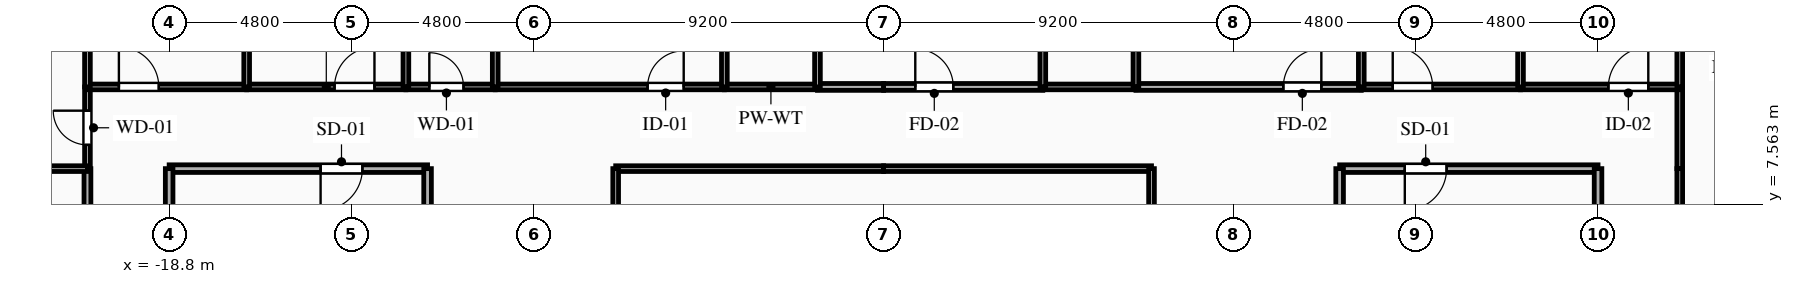
"""IFC4 building model, lengths in metres.
Left out: names, types, materials, properties, quantities, classifications, styles, units other than length and angle.
Written with IfcOpenShell. Run it as: python <this file> out.ifc"""

import sys

from ifc_helpers import new_model, si_unit, direction, frame, frame_2d, origin, place, context, subcontext, project, spatial, rectangle, extrude, element, fill, save


model = new_model("IFC4")
c1 = context("Model", 3, precision=1e-05, world=origin(), true_north=direction((0.0, 1.0)))
c2 = subcontext(c1, "Body", "Model", "MODEL_VIEW")
j1 = project(units=[si_unit("LENGTHUNIT", "METRE"), si_unit("PLANEANGLEUNIT", "RADIAN")], contexts=[c1])
p1 = place(None, origin())
s1 = spatial("IfcSite", under=j1, at=p1, CompositionType="ELEMENT")
p2 = place(p1, origin())
s2 = spatial("IfcBuilding", under=s1, at=p2, CompositionType="ELEMENT")
p3 = place(p2, frame((0.0, 0.0, 131.0)))
s3 = spatial("IfcBuildingStorey", under=s2, at=p3, CompositionType="ELEMENT", Elevation=131.0)
p4 = place(p3, frame((-12.0, 8.5, 0.0), z_axis=(0.0, 0.0, 1.0), x_axis=(-1.0, 0.0, 0.0)))
e1 = element("IfcWall", 1, at=p4, inside=s3, PredefinedType="PARTITIONING", context=c2, shape_type="SweptSolid", body=[
    extrude(rectangle(XDim=6.8, YDim=0.2, at=frame_2d((3.4, 0.0))), origin(), (0.0, 0.0, 1.0), 3.04),
])
p5 = place(p4, frame((1.715, 0.0, 0.0)))
e2 = element("IfcOpeningElement", 2, at=p5, cuts=e1, PredefinedType="OPENING", context=c2, shape_type="SweptSolid", body=[
    extrude(rectangle(XDim=1.1, YDim=2.15, at=frame_2d((0.55, 1.075))), frame((0.0, 0.11, 0.0), z_axis=(0.0, -1.0, 0.0), x_axis=(1.0, 0.0, 0.0)), (0.0, 0.0, 1.0), 0.22),
])
p6 = place(p3, frame((-18.8, 8.5, 0.0), z_axis=(0.0, 0.0, 1.0), x_axis=(0.0, -1.0, 0.0)))
e3 = element("IfcWall", 3, at=p6, inside=s3, PredefinedType="PARTITIONING", context=c2, shape_type="SweptSolid", body=[
    extrude(rectangle(XDim=2.9, YDim=0.2, at=frame_2d((1.45, 0.0))), origin(), (0.0, 0.0, 1.0), 2.525),
])
p7 = place(p3, frame((-12.0, 5.6, 0.0), z_axis=(0.0, 0.0, 1.0), x_axis=(0.0, 1.0, 0.0)))
e4 = element("IfcWall", 4, at=p7, inside=s3, PredefinedType="PARTITIONING", context=c2, shape_type="SweptSolid", body=[
    extrude(rectangle(XDim=2.9, YDim=0.2, at=frame_2d((1.45, 0.0))), origin(), (0.0, 0.0, 1.0), 3.04),
])
p8 = place(p3, frame((18.8, 8.5, 0.0), z_axis=(0.0, 0.0, 1.0), x_axis=(-1.0, 0.0, 0.0)))
e5 = element("IfcWall", 5, at=p8, inside=s3, PredefinedType="PARTITIONING", context=c2, shape_type="SweptSolid", body=[
    extrude(rectangle(XDim=6.8, YDim=0.2, at=frame_2d((3.4, 0.0))), origin(), (0.0, 0.0, 1.0), 3.04),
])
p9 = place(p8, frame((3.985, 0.0, 0.0)))
e6 = element("IfcOpeningElement", 6, at=p9, cuts=e5, PredefinedType="OPENING", context=c2, shape_type="SweptSolid", body=[
    extrude(rectangle(XDim=1.1, YDim=2.15, at=frame_2d((0.55, 1.075))), frame((0.0, 0.11, 0.0), z_axis=(0.0, -1.0, 0.0), x_axis=(1.0, 0.0, 0.0)), (0.0, 0.0, 1.0), 0.22),
])
p10 = place(p3, frame((18.8, 5.6, 0.0), z_axis=(0.0, 0.0, 1.0), x_axis=(0.0, 1.0, 0.0)))
e7 = element("IfcWall", 7, at=p10, inside=s3, PredefinedType="PARTITIONING", context=c2, shape_type="SweptSolid", body=[
    extrude(rectangle(XDim=2.9, YDim=0.2, at=frame_2d((1.45, 0.0))), origin(), (0.0, 0.0, 1.0), 2.525),
])
p11 = place(p3, frame((12.0, 8.5, 0.0), z_axis=(0.0, 0.0, 1.0), x_axis=(0.0, -1.0, 0.0)))
e8 = element("IfcWall", 8, at=p11, inside=s3, PredefinedType="PARTITIONING", context=c2, shape_type="SweptSolid", body=[
    extrude(rectangle(XDim=2.9, YDim=0.2, at=frame_2d((1.45, 0.0))), origin(), (0.0, 0.0, 1.0), 3.04),
])
p12 = place(p3, frame((-20.95, 8.5, 0.0), z_axis=(0.0, 0.0, 1.0), x_axis=(0.0, 1.0, 0.0)))
e9 = element("IfcWall", 9, at=p12, inside=s3, PredefinedType="PARTITIONING", context=c2, shape_type="SweptSolid", body=[
    extrude(rectangle(XDim=2.15, YDim=0.15, at=frame_2d((1.075, 0.0))), origin(), (0.0, 0.0, 1.0), 3.04),
])
p13 = place(p12, frame((0.625, 0.0, 0.0)))
e10 = element("IfcOpeningElement", 10, at=p13, cuts=e9, PredefinedType="OPENING", context=c2, shape_type="SweptSolid", body=[
    extrude(rectangle(XDim=0.9, YDim=2.1, at=frame_2d((0.45, 1.05))), frame((0.0, 0.085, 0.0), z_axis=(0.0, -1.0, 0.0), x_axis=(1.0, 0.0, 0.0)), (0.0, 0.0, 1.0), 0.17),
])
p14 = place(p3, frame((-20.95, 10.65, 0.0), z_axis=(0.0, 0.0, 1.0), x_axis=(1.0, 0.0, 0.0)))
e11 = element("IfcWall", 11, at=p14, inside=s3, PredefinedType="PARTITIONING", context=c2, shape_type="SweptSolid", body=[
    extrude(rectangle(XDim=4.19, YDim=0.15, at=frame_2d((2.095, 0.0))), origin(), (0.0, 0.0, 1.0), 3.04),
])
p15 = place(p14, frame((0.827, 0.0, 0.0)))
e12 = element("IfcOpeningElement", 12, at=p15, cuts=e11, PredefinedType="OPENING", context=c2, shape_type="SweptSolid", body=[
    extrude(rectangle(XDim=1.05, YDim=2.15, at=frame_2d((0.525, 1.075))), frame((0.0, 0.085, 0.0), z_axis=(0.0, -1.0, 0.0), x_axis=(1.0, 0.0, 0.0)), (0.0, 0.0, 1.0), 0.17),
])
p16 = place(p3, frame((-16.76, 10.65, 0.0), z_axis=(0.0, 0.0, 1.0), x_axis=(1.0, 0.0, 0.0)))
e13 = element("IfcWall", 13, at=p16, inside=s3, PredefinedType="PARTITIONING", context=c2, shape_type="SweptSolid", body=[
    extrude(rectangle(XDim=4.19, YDim=0.15, at=frame_2d((2.095, 0.0))), origin(), (0.0, 0.0, 1.0), 3.04),
])
p17 = place(p16, frame((2.312, 0.0, 0.0)))
e14 = element("IfcOpeningElement", 14, at=p17, cuts=e13, PredefinedType="OPENING", context=c2, shape_type="SweptSolid", body=[
    extrude(rectangle(XDim=1.05, YDim=2.15, at=frame_2d((0.525, 1.075))), frame((0.0, 0.085, 0.0), z_axis=(0.0, -1.0, 0.0), x_axis=(1.0, 0.0, 0.0)), (0.0, 0.0, 1.0), 0.17),
])
p18 = place(p3, frame((-12.57, 10.65, 0.0), z_axis=(0.0, 0.0, 1.0), x_axis=(1.0, 0.0, 0.0)))
e15 = element("IfcWall", 15, at=p18, inside=s3, PredefinedType="PLUMBINGWALL", context=c2, shape_type="SweptSolid", body=[
    extrude(rectangle(XDim=2.35, YDim=0.15, at=frame_2d((1.175, 0.0))), origin(), (0.0, 0.0, 1.0), 3.04),
])
p19 = place(p18, frame((0.616, 0.0, 0.0)))
e16 = element("IfcOpeningElement", 16, at=p19, cuts=e15, PredefinedType="OPENING", context=c2, shape_type="SweptSolid", body=[
    extrude(rectangle(XDim=0.9, YDim=2.1, at=frame_2d((0.45, 1.05))), frame((0.0, 0.085, 0.0), z_axis=(0.0, -1.0, 0.0), x_axis=(1.0, 0.0, 0.0)), (0.0, 0.0, 1.0), 0.17),
])
p20 = place(p3, frame((-10.22, 10.65, 0.0), z_axis=(0.0, 0.0, 1.0), x_axis=(1.0, 0.0, 0.0)))
e17 = element("IfcWall", 17, at=p20, inside=s3, PredefinedType="PARTITIONING", context=c2, shape_type="SweptSolid", body=[
    extrude(rectangle(XDim=6.03, YDim=0.15, at=frame_2d((3.015, 0.0))), origin(), (0.0, 0.0, 1.0), 3.04),
])
p21 = place(p20, frame((4.01, 0.0, 0.0)))
e18 = element("IfcOpeningElement", 18, at=p21, cuts=e17, PredefinedType="OPENING", context=c2, shape_type="SweptSolid", body=[
    extrude(rectangle(XDim=0.95, YDim=2.1, at=frame_2d((0.475, 1.05))), frame((0.0, 0.085, 0.0), z_axis=(0.0, -1.0, 0.0), x_axis=(1.0, 0.0, 0.0)), (0.0, 0.0, 1.0), 0.17),
])
p22 = place(p3, frame((-1.74, 10.65, 0.0), z_axis=(0.0, 0.0, 1.0), x_axis=(1.0, 0.0, 0.0)))
e19 = element("IfcWall", 19, at=p22, inside=s3, PredefinedType="PARTITIONING", context=c2, shape_type="SweptSolid", body=[
    extrude(rectangle(XDim=1.74, YDim=0.18, at=frame_2d((0.87, 0.0))), origin(), (0.0, 0.0, 1.0), 3.04),
])
p23 = place(p3, frame((-4.19, 10.65, 0.0), z_axis=(0.0, 0.0, 1.0), x_axis=(1.0, 0.0, 0.0)))
e20 = element("IfcWall", 20, at=p23, inside=s3, PredefinedType="PLUMBINGWALL", context=c2, shape_type="SweptSolid", body=[
    extrude(rectangle(XDim=2.45, YDim=0.15, at=frame_2d((1.225, 0.0))), origin(), (0.0, 0.0, 1.0), 3.04),
])
p24 = place(p3, frame((0.0, 8.5, 0.0), z_axis=(0.0, 0.0, 1.0), x_axis=(-1.0, 0.0, 0.0)))
e21 = element("IfcWall", 21, at=p24, inside=s3, PredefinedType="PARTITIONING", context=c2, shape_type="SweptSolid", body=[
    extrude(rectangle(XDim=7.05, YDim=0.15, at=frame_2d((3.525, 0.0))), origin(), (0.0, 0.0, 1.0), 3.04),
])
p25 = place(p3, frame((20.95, 10.65, 0.0), z_axis=(0.0, 0.0, 1.0), x_axis=(0.0, -1.0, 0.0)))
e22 = element("IfcWall", 22, at=p25, inside=s3, PredefinedType="PARTITIONING", context=c2, shape_type="SweptSolid", body=[
    extrude(rectangle(XDim=2.15, YDim=0.15, at=frame_2d((1.075, 0.0))), origin(), (0.0, 0.0, 1.0), 3.04),
])
p26 = place(p3, frame((0.0, 10.65, 0.0), z_axis=(0.0, 0.0, 1.0), x_axis=(1.0, 0.0, 0.0)))
e23 = element("IfcWall", 23, at=p26, inside=s3, PredefinedType="PARTITIONING", context=c2, shape_type="SweptSolid", body=[
    extrude(rectangle(XDim=4.19, YDim=0.18, at=frame_2d((2.095, 0.0))), origin(), (0.0, 0.0, 1.0), 3.04),
])
p27 = place(p26, frame((0.834, 0.0, 0.0)))
e24 = element("IfcOpeningElement", 24, at=p27, cuts=e23, PredefinedType="OPENING", context=c2, shape_type="SweptSolid", body=[
    extrude(rectangle(XDim=1.0, YDim=2.15, at=frame_2d((0.5, 1.075))), frame((0.0, 0.1, 0.0), z_axis=(0.0, -1.0, 0.0), x_axis=(1.0, 0.0, 0.0)), (0.0, 0.0, 1.0), 0.2),
])
p28 = place(p3, frame((6.64, 10.65, 0.0), z_axis=(0.0, 0.0, 1.0), x_axis=(1.0, 0.0, 0.0)))
e25 = element("IfcWall", 25, at=p28, inside=s3, PredefinedType="PARTITIONING", context=c2, shape_type="SweptSolid", body=[
    extrude(rectangle(XDim=5.93, YDim=0.18, at=frame_2d((2.965, 0.0))), origin(), (0.0, 0.0, 1.0), 3.04),
])
p29 = place(p28, frame((3.879, 0.0, 0.0)))
e26 = element("IfcOpeningElement", 26, at=p29, cuts=e25, PredefinedType="OPENING", context=c2, shape_type="SweptSolid", body=[
    extrude(rectangle(XDim=1.0, YDim=2.15, at=frame_2d((0.5, 1.075))), frame((0.0, 0.1, 0.0), z_axis=(0.0, -1.0, 0.0), x_axis=(1.0, 0.0, 0.0)), (0.0, 0.0, 1.0), 0.2),
])
p30 = place(p3, frame((4.19, 10.65, 0.0), z_axis=(0.0, 0.0, 1.0), x_axis=(1.0, 0.0, 0.0)))
e27 = element("IfcWall", 27, at=p30, inside=s3, PredefinedType="PLUMBINGWALL", context=c2, shape_type="SweptSolid", body=[
    extrude(rectangle(XDim=2.45, YDim=0.15, at=frame_2d((1.225, 0.0))), origin(), (0.0, 0.0, 1.0), 3.04),
])
p31 = place(p3, frame((12.57, 10.65, 0.0), z_axis=(0.0, 0.0, 1.0), x_axis=(1.0, 0.0, 0.0)))
e28 = element("IfcWall", 28, at=p31, inside=s3, PredefinedType="PARTITIONING", context=c2, shape_type="SweptSolid", body=[
    extrude(rectangle(XDim=4.19, YDim=0.15, at=frame_2d((2.095, 0.0))), origin(), (0.0, 0.0, 1.0), 3.04),
])
p32 = place(p31, frame((0.827, 0.0, 0.0)))
e29 = element("IfcOpeningElement", 29, at=p32, cuts=e28, PredefinedType="OPENING", context=c2, shape_type="SweptSolid", body=[
    extrude(rectangle(XDim=1.05, YDim=2.15, at=frame_2d((0.525, 1.075))), frame((0.0, 0.085, 0.0), z_axis=(0.0, -1.0, 0.0), x_axis=(1.0, 0.0, 0.0)), (0.0, 0.0, 1.0), 0.17),
])
p33 = place(p3, frame((16.76, 10.65, 0.0), z_axis=(0.0, 0.0, 1.0), x_axis=(1.0, 0.0, 0.0)))
e30 = element("IfcWall", 30, at=p33, inside=s3, PredefinedType="PARTITIONING", context=c2, shape_type="SweptSolid", body=[
    extrude(rectangle(XDim=4.19, YDim=0.15, at=frame_2d((2.095, 0.0))), origin(), (0.0, 0.0, 1.0), 3.04),
])
p34 = place(p33, frame((2.312, 0.0, 0.0)))
e31 = element("IfcOpeningElement", 31, at=p34, cuts=e30, PredefinedType="OPENING", context=c2, shape_type="SweptSolid", body=[
    extrude(rectangle(XDim=1.05, YDim=2.15, at=frame_2d((0.525, 1.075))), frame((0.0, 0.085, 0.0), z_axis=(0.0, -1.0, 0.0), x_axis=(1.0, 0.0, 0.0)), (0.0, 0.0, 1.0), 0.17),
])
p35 = place(p3, frame((7.05, 8.5, 0.0), z_axis=(0.0, 0.0, 1.0), x_axis=(-1.0, 0.0, 0.0)))
e32 = element("IfcWall", 32, at=p35, inside=s3, PredefinedType="PARTITIONING", context=c2, shape_type="SweptSolid", body=[
    extrude(rectangle(XDim=7.05, YDim=0.15, at=frame_2d((3.525, 0.0))), origin(), (0.0, 0.0, 1.0), 3.04),
])
p36 = place(p3, frame((-20.95, -5.6, 0.0), z_axis=(0.0, 0.0, 1.0), x_axis=(0.0, 1.0, 0.0)))
e33 = element("IfcWall", 33, at=p36, inside=s3, PredefinedType="PARTITIONING", context=c2, shape_type="SweptSolid", body=[
    extrude(rectangle(XDim=14.1, YDim=0.18, at=frame_2d((7.05, 0.0))), origin(), (0.0, 0.0, 1.0), 3.04),
])
p37 = place(p36, frame((5.058, 0.0, 0.0)))
e34 = element("IfcOpeningElement", 34, at=p37, cuts=e33, PredefinedType="OPENING", context=c2, shape_type="SweptSolid", body=[
    extrude(rectangle(XDim=1.0, YDim=2.15, at=frame_2d((0.5, 1.075))), frame((0.0, 0.1, 0.0), z_axis=(0.0, -1.0, 0.0), x_axis=(1.0, 0.0, 0.0)), (0.0, 0.0, 1.0), 0.2),
])
p38 = place(p3, frame((20.95, 8.5, 0.0), z_axis=(0.0, 0.0, 1.0), x_axis=(0.0, -1.0, 0.0)))
e35 = element("IfcWall", 35, at=p38, inside=s3, PredefinedType="PARTITIONING", context=c2, shape_type="SweptSolid", body=[
    extrude(rectangle(XDim=6.1, YDim=0.15, at=frame_2d((3.05, 0.0))), origin(), (0.0, 0.0, 1.0), 3.04),
])
p39 = place(p38, frame((3.984, 0.0, 0.0)))
e36 = element("IfcOpeningElement", 36, at=p39, cuts=e35, PredefinedType="OPENING", context=c2, shape_type="SweptSolid", body=[
    extrude(rectangle(XDim=1.05, YDim=2.15, at=frame_2d((0.525, 1.075))), frame((0.0, 0.085, 0.0), z_axis=(0.0, -1.0, 0.0), x_axis=(1.0, 0.0, 0.0)), (0.0, 0.0, 1.0), 0.17),
])
for number, where, z_axis, x_axis in (
    (37, (-7.05, 8.5, 0.0), (0.0, 0.0, 1.0), (0.0, -1.0, 0.0)),
    (38, (7.05, -0.8, 0.0), (0.0, 0.0, 1.0), (0.0, 1.0, 0.0)),
):
    element("IfcWall", number, at=place(p3, frame(where, z_axis=z_axis, x_axis=x_axis)), inside=s3, PredefinedType="PARTITIONING", context=c2, shape_type="SweptSolid", body=[
        extrude(rectangle(XDim=9.3, YDim=0.15, at=frame_2d((4.65, 0.0))), origin(), (0.0, 0.0, 1.0), 3.04),
    ])
p40 = place(p3, frame((-23.6, 8.5, 0.0), z_axis=(0.0, 0.0, 1.0), x_axis=(1.0, 0.0, 0.0)))
e39 = element("IfcWall", 39, at=p40, inside=s3, PredefinedType="PARTITIONING", context=c2, shape_type="SweptSolid", body=[
    extrude(rectangle(XDim=2.65, YDim=0.15, at=frame_2d((1.325, 0.0))), origin(), (0.0, 0.0, 1.0), 3.04),
])
p41 = place(p40, frame((0.635, 0.0, 0.0)))
e40 = element("IfcOpeningElement", 40, at=p41, cuts=e39, PredefinedType="OPENING", context=c2, shape_type="SweptSolid", body=[
    extrude(rectangle(XDim=1.05, YDim=2.15, at=frame_2d((0.525, 1.075))), frame((0.0, 0.085, 0.0), z_axis=(0.0, -1.0, 0.0), x_axis=(1.0, 0.0, 0.0)), (0.0, 0.0, 1.0), 0.17),
])
p42 = place(p3, frame((-20.95, 20.4, 0.0), z_axis=(0.0, 0.0, 1.0), x_axis=(0.0, -1.0, 0.0)))
e41 = element("IfcWall", 41, at=p42, inside=s3, PredefinedType="PARTITIONING", context=c2, shape_type="SweptSolid", body=[
    extrude(rectangle(XDim=9.75, YDim=0.15, at=frame_2d((4.875, 0.0))), origin(), (0.0, 0.0, 1.0), 3.04),
])
p43 = place(p3, frame((20.95, 10.65, 0.0), z_axis=(0.0, 0.0, 1.0), x_axis=(0.0, 1.0, 0.0)))
e42 = element("IfcWall", 42, at=p43, inside=s3, PredefinedType="PARTITIONING", context=c2, shape_type="SweptSolid", body=[
    extrude(rectangle(XDim=9.75, YDim=0.15, at=frame_2d((4.875, 0.0))), origin(), (0.0, 0.0, 1.0), 2.525),
])
p44 = place(p3, frame((-16.76, 20.4, 0.0), z_axis=(0.0, 0.0, 1.0), x_axis=(0.0, -1.0, 0.0)))
e43 = element("IfcWall", 43, at=p44, inside=s3, PredefinedType="PARTITIONING", context=c2, shape_type="SweptSolid", body=[
    extrude(rectangle(XDim=9.75, YDim=0.15, at=frame_2d((4.875, 0.0))), origin(), (0.0, 0.0, 1.0), 3.04),
])
for number, where, z_axis, x_axis in (
    (44, (-12.57, 20.4, 0.0), (0.0, 0.0, 1.0), (0.0, -1.0, 0.0)),
    (45, (-10.22, 20.4, 0.0), (0.0, 0.0, 1.0), (0.0, -1.0, 0.0)),
):
    element("IfcWall", number, at=place(p3, frame(where, z_axis=z_axis, x_axis=x_axis)), inside=s3, PredefinedType="PLUMBINGWALL", context=c2, shape_type="SweptSolid", body=[
        extrude(rectangle(XDim=9.75, YDim=0.15, at=frame_2d((4.875, 0.0))), origin(), (0.0, 0.0, 1.0), 3.04),
    ])
for number, where, z_axis, x_axis in (
    (46, (-4.19, 12.8, 0.0), (0.0, 0.0, 1.0), (0.0, -1.0, 0.0)),
    (47, (-1.74, 10.65, 0.0), (0.0, 0.0, 1.0), (0.0, 1.0, 0.0)),
    (48, (4.19, 12.8, 0.0), (0.0, 0.0, 1.0), (0.0, -1.0, 0.0)),
    (49, (6.64, 10.65, 0.0), (0.0, 0.0, 1.0), (0.0, 1.0, 0.0)),
):
    element("IfcWall", number, at=place(p3, frame(where, z_axis=z_axis, x_axis=x_axis)), inside=s3, PredefinedType="PLUMBINGWALL", context=c2, shape_type="SweptSolid", body=[
        extrude(rectangle(XDim=2.15, YDim=0.15, at=frame_2d((1.075, 0.0))), origin(), (0.0, 0.0, 1.0), 3.04),
    ])
p45 = place(p3, frame((12.57, 20.4, 0.0), z_axis=(0.0, 0.0, 1.0), x_axis=(0.0, -1.0, 0.0)))
e50 = element("IfcWall", 50, at=p45, inside=s3, PredefinedType="PARTITIONING", context=c2, shape_type="SweptSolid", body=[
    extrude(rectangle(XDim=9.75, YDim=0.15, at=frame_2d((4.875, 0.0))), origin(), (0.0, 0.0, 1.0), 3.04),
])
p46 = place(p3, frame((16.76, 20.4, 0.0), z_axis=(0.0, 0.0, 1.0), x_axis=(0.0, -1.0, 0.0)))
e51 = element("IfcWall", 51, at=p46, inside=s3, PredefinedType="PARTITIONING", context=c2, shape_type="SweptSolid", body=[
    extrude(rectangle(XDim=9.75, YDim=0.15, at=frame_2d((4.875, 0.0))), origin(), (0.0, 0.0, 1.0), 2.525),
])
p47 = place(p5, origin())
e52 = element("IfcDoor", 52, at=p47, inside=s3, OperationType="SINGLE_SWING_RIGHT", PredefinedType="DOOR", context=c2, shape_type="SweptSolid", body=[
    extrude(rectangle(XDim=1.1, YDim=2.15, at=frame_2d((0.55, 1.075))), frame((0.0, 0.025, 0.0), z_axis=(0.0, -1.0, 0.0), x_axis=(1.0, 0.0, 0.0)), (0.0, 0.0, 1.0), 0.05),
])
fill(e2, e52)
p48 = place(p9, origin())
e53 = element("IfcDoor", 53, at=p48, inside=s3, OperationType="SINGLE_SWING_RIGHT", PredefinedType="DOOR", context=c2, shape_type="SweptSolid", body=[
    extrude(rectangle(XDim=1.1, YDim=2.15, at=frame_2d((0.55, 1.075))), frame((0.0, 0.025, 0.0), z_axis=(0.0, -1.0, 0.0), x_axis=(1.0, 0.0, 0.0)), (0.0, 0.0, 1.0), 0.05),
])
fill(e6, e53)
p49 = place(p13, origin())
e54 = element("IfcDoor", 54, at=p49, inside=s3, OperationType="SINGLE_SWING_RIGHT", PredefinedType="DOOR", context=c2, shape_type="SweptSolid", body=[
    extrude(rectangle(XDim=0.9, YDim=2.1, at=frame_2d((0.45, 1.05))), frame((0.0, 0.025, 0.0), z_axis=(0.0, -1.0, 0.0), x_axis=(1.0, 0.0, 0.0)), (0.0, 0.0, 1.0), 0.05),
])
fill(e10, e54)
p50 = place(p15, origin())
e55 = element("IfcDoor", 55, at=p50, inside=s3, OperationType="SINGLE_SWING_LEFT", PredefinedType="DOOR", context=c2, shape_type="SweptSolid", body=[
    extrude(rectangle(XDim=1.05, YDim=2.15, at=frame_2d((0.525, 1.075))), frame((0.0, 0.025, 0.0), z_axis=(0.0, -1.0, 0.0), x_axis=(1.0, 0.0, 0.0)), (0.0, 0.0, 1.0), 0.05),
])
fill(e12, e55)
p51 = place(p17, origin())
e56 = element("IfcDoor", 56, at=p51, inside=s3, OperationType="SINGLE_SWING_RIGHT", PredefinedType="DOOR", context=c2, shape_type="SweptSolid", body=[
    extrude(rectangle(XDim=1.05, YDim=2.15, at=frame_2d((0.525, 1.075))), frame((0.0, 0.025, 0.0), z_axis=(0.0, -1.0, 0.0), x_axis=(1.0, 0.0, 0.0)), (0.0, 0.0, 1.0), 0.05),
])
fill(e14, e56)
p52 = place(p19, origin())
e57 = element("IfcDoor", 57, at=p52, inside=s3, OperationType="SINGLE_SWING_LEFT", PredefinedType="DOOR", context=c2, shape_type="SweptSolid", body=[
    extrude(rectangle(XDim=0.9, YDim=2.1, at=frame_2d((0.45, 1.05))), frame((0.0, 0.025, 0.0), z_axis=(0.0, -1.0, 0.0), x_axis=(1.0, 0.0, 0.0)), (0.0, 0.0, 1.0), 0.05),
])
fill(e16, e57)
p53 = place(p21, origin())
e58 = element("IfcDoor", 58, at=p53, inside=s3, OperationType="SINGLE_SWING_RIGHT", PredefinedType="DOOR", context=c2, shape_type="SweptSolid", body=[
    extrude(rectangle(XDim=0.95, YDim=2.1, at=frame_2d((0.475, 1.05))), frame((0.0, 0.025, 0.0), z_axis=(0.0, -1.0, 0.0), x_axis=(1.0, 0.0, 0.0)), (0.0, 0.0, 1.0), 0.05),
])
fill(e18, e58)
p54 = place(p27, origin())
e59 = element("IfcDoor", 59, at=p54, inside=s3, OperationType="SINGLE_SWING_LEFT", PredefinedType="DOOR", context=c2, shape_type="SweptSolid", body=[
    extrude(rectangle(XDim=1.0, YDim=2.15, at=frame_2d((0.5, 1.075))), frame((0.0, 0.025, 0.0), z_axis=(0.0, -1.0, 0.0), x_axis=(1.0, 0.0, 0.0)), (0.0, 0.0, 1.0), 0.05),
])
fill(e24, e59)
p55 = place(p29, origin())
e60 = element("IfcDoor", 60, at=p55, inside=s3, OperationType="SINGLE_SWING_RIGHT", PredefinedType="DOOR", context=c2, shape_type="SweptSolid", body=[
    extrude(rectangle(XDim=1.0, YDim=2.15, at=frame_2d((0.5, 1.075))), frame((0.0, 0.025, 0.0), z_axis=(0.0, -1.0, 0.0), x_axis=(1.0, 0.0, 0.0)), (0.0, 0.0, 1.0), 0.05),
])
fill(e26, e60)
p56 = place(p32, origin())
e61 = element("IfcDoor", 61, at=p56, inside=s3, OperationType="SINGLE_SWING_LEFT", PredefinedType="DOOR", context=c2, shape_type="SweptSolid", body=[
    extrude(rectangle(XDim=1.05, YDim=2.15, at=frame_2d((0.525, 1.075))), frame((0.0, 0.025, 0.0), z_axis=(0.0, -1.0, 0.0), x_axis=(1.0, 0.0, 0.0)), (0.0, 0.0, 1.0), 0.05),
])
fill(e29, e61)
p57 = place(p34, origin())
e62 = element("IfcDoor", 62, at=p57, inside=s3, OperationType="SINGLE_SWING_RIGHT", PredefinedType="DOOR", context=c2, shape_type="SweptSolid", body=[
    extrude(rectangle(XDim=1.05, YDim=2.15, at=frame_2d((0.525, 1.075))), frame((0.0, 0.025, 0.0), z_axis=(0.0, -1.0, 0.0), x_axis=(1.0, 0.0, 0.0)), (0.0, 0.0, 1.0), 0.05),
])
fill(e31, e62)
save(model, sys.argv[1])
